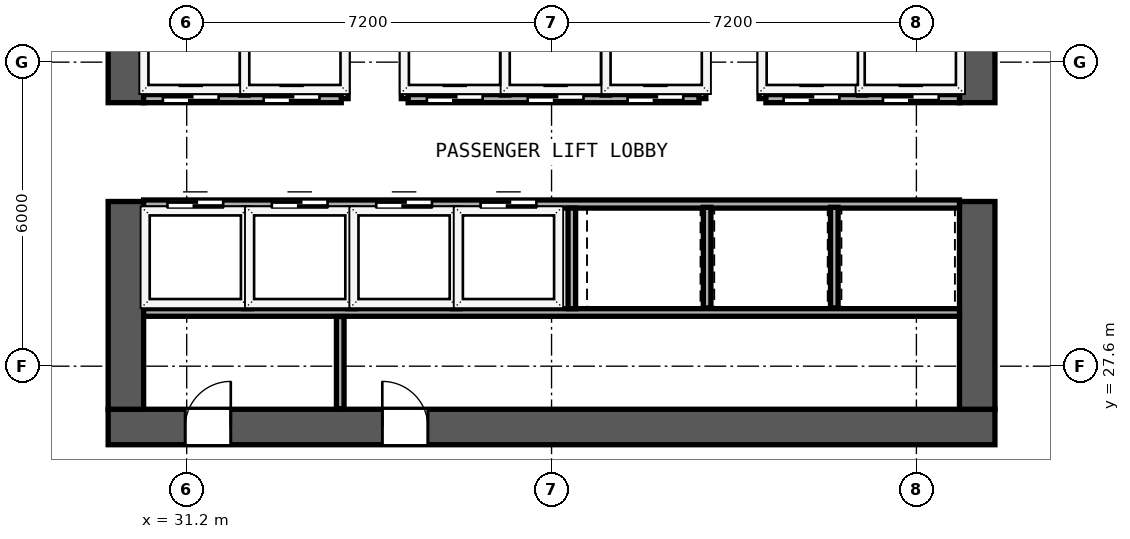
"""IFC4 building model, lengths in metres.
Left out: names, types, materials, properties, quantities, classifications, styles, units other than length and angle.
Written with IfcOpenShell. Run it as: python <this file> out.ifc"""

import sys

from ifc_helpers import new_model, si_unit, direction, frame, frame_2d, origin, place, context, subcontext, project, spatial, rectangle, extrude, element, fill, save


model = new_model("IFC4")
c1 = context("Model", 3, precision=1e-05, world=origin(), true_north=direction((0.0, 1.0)))
c2 = subcontext(c1, "Body", "Model", "MODEL_VIEW")
j1 = project(units=[si_unit("LENGTHUNIT", "METRE"), si_unit("PLANEANGLEUNIT", "RADIAN")], contexts=[c1])
p1 = place(None, origin())
s1 = spatial("IfcSite", under=j1, at=p1, CompositionType="ELEMENT")
p2 = place(p1, origin())
s2 = spatial("IfcBuilding", under=s1, at=p2, CompositionType="ELEMENT")
p3 = place(p2, frame((0.0, 0.0, 94.0)))
s3 = spatial("IfcBuildingStorey", under=s2, at=p3, CompositionType="ELEMENT", Elevation=94.0)
p4 = place(p3, frame((29.65, 26.4, 0.0), z_axis=(0.0, 0.0, 1.0), x_axis=(1.0, 0.0, 0.0)))
e1 = element("IfcWall", 1, at=p4, inside=s3, PredefinedType="SHEAR", context=c2, shape_type="SweptSolid", body=[
    extrude(rectangle(XDim=17.5, YDim=0.7, at=frame_2d((8.75, 0.0))), origin(), (0.0, 0.0, 1.0), 4.2),
])
p5 = place(p4, frame((2.42, 0.0, 0.0), z_axis=(0.0, 0.0, 1.0), x_axis=(-1.0, 0.0, 0.0)))
e2 = element("IfcOpeningElement", 2, at=p5, cuts=e1, PredefinedType="OPENING", context=c2, shape_type="SweptSolid", body=[
    extrude(rectangle(XDim=0.9, YDim=2.1, at=frame_2d((0.45, 1.05))), frame((0.0, 0.36, 0.0), z_axis=(0.0, -1.0, 0.0), x_axis=(1.0, 0.0, 0.0)), (0.0, 0.0, 1.0), 0.72),
])
p6 = place(p4, frame((6.31, 0.0, 0.0), z_axis=(0.0, 0.0, 1.0), x_axis=(-1.0, 0.0, 0.0)))
e3 = element("IfcOpeningElement", 3, at=p6, cuts=e1, PredefinedType="OPENING", context=c2, shape_type="SweptSolid", body=[
    extrude(rectangle(XDim=0.9, YDim=2.1, at=frame_2d((0.45, 1.05))), frame((0.0, 0.36, 0.0), z_axis=(0.0, -1.0, 0.0), x_axis=(1.0, 0.0, 0.0)), (0.0, 0.0, 1.0), 0.72),
])
p7 = place(p3, frame((30.0, 26.75, 0.0), z_axis=(0.0, 0.0, 1.0), x_axis=(0.0, 1.0, 0.0)))
e4 = element("IfcWall", 4, at=p7, inside=s3, PredefinedType="SHEAR", context=c2, shape_type="SweptSolid", body=[
    extrude(rectangle(XDim=4.1, YDim=0.7, at=frame_2d((2.05, 0.0))), origin(), (0.0, 0.0, 1.0), 4.2),
])
p8 = place(p3, frame((30.0, 32.8, 0.0), z_axis=(0.0, 0.0, 1.0), x_axis=(0.0, 1.0, 0.0)))
e5 = element("IfcWall", 5, at=p8, inside=s3, PredefinedType="SHEAR", context=c2, shape_type="SweptSolid", body=[
    extrude(rectangle(XDim=10.05, YDim=0.7, at=frame_2d((5.025, 0.0))), origin(), (0.0, 0.0, 1.0), 4.2),
])
p9 = place(p3, frame((46.8, 26.75, 0.0), z_axis=(0.0, 0.0, 1.0), x_axis=(0.0, 1.0, 0.0)))
e6 = element("IfcWall", 6, at=p9, inside=s3, PredefinedType="SHEAR", context=c2, shape_type="SweptSolid", body=[
    extrude(rectangle(XDim=4.1, YDim=0.7, at=frame_2d((2.05, 0.0))), origin(), (0.0, 0.0, 1.0), 4.2),
])
p10 = place(p3, frame((46.8, 32.8, 0.0), z_axis=(0.0, 0.0, 1.0), x_axis=(0.0, 1.0, 0.0)))
e7 = element("IfcWall", 7, at=p10, inside=s3, PredefinedType="SHEAR", context=c2, shape_type="SweptSolid", body=[
    extrude(rectangle(XDim=10.05, YDim=0.7, at=frame_2d((5.025, 0.0))), origin(), (0.0, 0.0, 1.0), 4.2),
])
for number, where, z_axis, x_axis in (
    (8, (34.31, 32.88, 0.0), (0.0, 0.0, 1.0), (0.0, 1.0, 0.0)),
    (9, (35.51, 32.88, 0.0), (0.0, 0.0, 1.0), (0.0, 1.0, 0.0)),
    (10, (41.37, 32.88, 0.0), (0.0, 0.0, 1.0), (0.0, 1.0, 0.0)),
    (11, (42.57, 32.88, 0.0), (0.0, 0.0, 1.0), (0.0, 1.0, 0.0)),
):
    element("IfcWall", number, at=place(p3, frame(where, z_axis=z_axis, x_axis=x_axis)), inside=s3, PredefinedType="SOLIDWALL", context=c2, shape_type="SweptSolid", body=[
        extrude(rectangle(XDim=2.17, YDim=0.15, at=frame_2d((1.085, 0.0))), origin(), (0.0, 0.0, 1.0), 4.2),
    ])
p11 = place(p3, frame((30.35, 32.88, 0.0), z_axis=(0.0, 0.0, 1.0), x_axis=(1.0, 0.0, 0.0)))
e12 = element("IfcWall", 12, at=p11, inside=s3, PredefinedType="SOLIDWALL", context=c2, shape_type="SweptSolid", body=[
    extrude(rectangle(XDim=3.9, YDim=0.16, at=frame_2d((1.95, 0.0))), origin(), (0.0, 0.0, 1.0), 4.2),
])
p12 = place(p11, frame((1.48, 0.0, 0.0), z_axis=(0.0, 0.0, 1.0), x_axis=(-1.0, 0.0, 0.0)))
e13 = element("IfcOpeningElement", 13, at=p12, cuts=e12, PredefinedType="OPENING", context=c2, shape_type="SweptSolid", body=[
    extrude(rectangle(XDim=1.1, YDim=2.2, at=frame_2d((0.55, 1.1))), frame((0.0, 0.09, 0.0), z_axis=(0.0, -1.0, 0.0), x_axis=(1.0, 0.0, 0.0)), (0.0, 0.0, 1.0), 0.18),
])
p13 = place(p11, frame((3.47, 0.0, 0.0), z_axis=(0.0, 0.0, 1.0), x_axis=(-1.0, 0.0, 0.0)))
e14 = element("IfcOpeningElement", 14, at=p13, cuts=e12, PredefinedType="OPENING", context=c2, shape_type="SweptSolid", body=[
    extrude(rectangle(XDim=1.1, YDim=2.2, at=frame_2d((0.55, 1.1))), frame((0.0, 0.09, 0.0), z_axis=(0.0, -1.0, 0.0), x_axis=(1.0, 0.0, 0.0)), (0.0, 0.0, 1.0), 0.18),
])
p14 = place(p3, frame((35.57, 32.88, 0.0), z_axis=(0.0, 0.0, 1.0), x_axis=(1.0, 0.0, 0.0)))
e15 = element("IfcWall", 15, at=p14, inside=s3, PredefinedType="SOLIDWALL", context=c2, shape_type="SweptSolid", body=[
    extrude(rectangle(XDim=5.74, YDim=0.16, at=frame_2d((2.87, 0.0))), origin(), (0.0, 0.0, 1.0), 4.2),
])
p15 = place(p14, frame((1.47, 0.0, 0.0), z_axis=(0.0, 0.0, 1.0), x_axis=(-1.0, 0.0, 0.0)))
e16 = element("IfcOpeningElement", 16, at=p15, cuts=e15, PredefinedType="OPENING", context=c2, shape_type="SweptSolid", body=[
    extrude(rectangle(XDim=1.1, YDim=2.2, at=frame_2d((0.55, 1.1))), frame((0.0, 0.09, 0.0), z_axis=(0.0, -1.0, 0.0), x_axis=(1.0, 0.0, 0.0)), (0.0, 0.0, 1.0), 0.18),
])
p16 = place(p14, frame((3.46, 0.0, 0.0), z_axis=(0.0, 0.0, 1.0), x_axis=(-1.0, 0.0, 0.0)))
e17 = element("IfcOpeningElement", 17, at=p16, cuts=e15, PredefinedType="OPENING", context=c2, shape_type="SweptSolid", body=[
    extrude(rectangle(XDim=1.1, YDim=2.2, at=frame_2d((0.55, 1.1))), frame((0.0, 0.09, 0.0), z_axis=(0.0, -1.0, 0.0), x_axis=(1.0, 0.0, 0.0)), (0.0, 0.0, 1.0), 0.18),
])
p17 = place(p14, frame((5.43, 0.0, 0.0), z_axis=(0.0, 0.0, 1.0), x_axis=(-1.0, 0.0, 0.0)))
e18 = element("IfcOpeningElement", 18, at=p17, cuts=e15, PredefinedType="OPENING", context=c2, shape_type="SweptSolid", body=[
    extrude(rectangle(XDim=1.1, YDim=2.2, at=frame_2d((0.55, 1.1))), frame((0.0, 0.09, 0.0), z_axis=(0.0, -1.0, 0.0), x_axis=(1.0, 0.0, 0.0)), (0.0, 0.0, 1.0), 0.18),
])
p18 = place(p3, frame((42.63, 32.88, 0.0), z_axis=(0.0, 0.0, 1.0), x_axis=(1.0, 0.0, 0.0)))
e19 = element("IfcWall", 19, at=p18, inside=s3, PredefinedType="SOLIDWALL", context=c2, shape_type="SweptSolid", body=[
    extrude(rectangle(XDim=3.82, YDim=0.16, at=frame_2d((1.91, 0.0))), origin(), (0.0, 0.0, 1.0), 4.2),
])
p19 = place(p18, frame((1.45, 0.0, 0.0), z_axis=(0.0, 0.0, 1.0), x_axis=(-1.0, 0.0, 0.0)))
e20 = element("IfcOpeningElement", 20, at=p19, cuts=e19, PredefinedType="OPENING", context=c2, shape_type="SweptSolid", body=[
    extrude(rectangle(XDim=1.1, YDim=2.2, at=frame_2d((0.55, 1.1))), frame((0.0, 0.09, 0.0), z_axis=(0.0, -1.0, 0.0), x_axis=(1.0, 0.0, 0.0)), (0.0, 0.0, 1.0), 0.18),
])
p20 = place(p18, frame((3.41, 0.0, 0.0), z_axis=(0.0, 0.0, 1.0), x_axis=(-1.0, 0.0, 0.0)))
e21 = element("IfcOpeningElement", 21, at=p20, cuts=e19, PredefinedType="OPENING", context=c2, shape_type="SweptSolid", body=[
    extrude(rectangle(XDim=1.1, YDim=2.2, at=frame_2d((0.55, 1.1))), frame((0.0, 0.09, 0.0), z_axis=(0.0, -1.0, 0.0), x_axis=(1.0, 0.0, 0.0)), (0.0, 0.0, 1.0), 0.18),
])
for number, where, z_axis, x_axis in (
    (22, (32.34, 32.95, 0.0), (0.0, 0.0, 1.0), (0.0, 1.0, 0.0)),
    (23, (37.48, 32.95, 0.0), (0.0, 0.0, 1.0), (0.0, 1.0, 0.0)),
    (24, (39.47, 32.95, 0.0), (0.0, 0.0, 1.0), (0.0, 1.0, 0.0)),
    (25, (44.53, 32.95, 0.0), (0.0, 0.0, 1.0), (0.0, 1.0, 0.0)),
):
    element("IfcWall", number, at=place(p3, frame(where, z_axis=z_axis, x_axis=x_axis)), inside=s3, PredefinedType="SOLIDWALL", context=c2, shape_type="SweptSolid", body=[
        extrude(rectangle(XDim=2.05, YDim=0.15, at=frame_2d((1.025, 0.0))), origin(), (0.0, 0.0, 1.0), 4.2),
    ])
p21 = place(p3, frame((30.35, 30.8, 0.0), z_axis=(0.0, 0.0, 1.0), x_axis=(1.0, 0.0, 0.0)))
e26 = element("IfcWall", 26, at=p21, inside=s3, PredefinedType="SOLIDWALL", context=c2, shape_type="SweptSolid", body=[
    extrude(rectangle(XDim=16.1, YDim=0.16, at=frame_2d((8.05, 0.0))), origin(), (0.0, 0.0, 1.0), 4.2),
])
p22 = place(p21, frame((0.47, 0.0, 0.0)))
e27 = element("IfcOpeningElement", 27, at=p22, cuts=e26, PredefinedType="OPENING", context=c2, shape_type="SweptSolid", body=[
    extrude(rectangle(XDim=1.1, YDim=2.2, at=frame_2d((0.55, 1.1))), frame((0.0, 0.09, 0.0), z_axis=(0.0, -1.0, 0.0), x_axis=(1.0, 0.0, 0.0)), (0.0, 0.0, 1.0), 0.18),
])
p23 = place(p21, frame((2.53, 0.0, 0.0)))
e28 = element("IfcOpeningElement", 28, at=p23, cuts=e26, PredefinedType="OPENING", context=c2, shape_type="SweptSolid", body=[
    extrude(rectangle(XDim=1.1, YDim=2.2, at=frame_2d((0.55, 1.1))), frame((0.0, 0.09, 0.0), z_axis=(0.0, -1.0, 0.0), x_axis=(1.0, 0.0, 0.0)), (0.0, 0.0, 1.0), 0.18),
])
p24 = place(p21, frame((4.59, 0.0, 0.0)))
e29 = element("IfcOpeningElement", 29, at=p24, cuts=e26, PredefinedType="OPENING", context=c2, shape_type="SweptSolid", body=[
    extrude(rectangle(XDim=1.1, YDim=2.2, at=frame_2d((0.55, 1.1))), frame((0.0, 0.09, 0.0), z_axis=(0.0, -1.0, 0.0), x_axis=(1.0, 0.0, 0.0)), (0.0, 0.0, 1.0), 0.18),
])
p25 = place(p21, frame((6.65, 0.0, 0.0)))
e30 = element("IfcOpeningElement", 30, at=p25, cuts=e26, PredefinedType="OPENING", context=c2, shape_type="SweptSolid", body=[
    extrude(rectangle(XDim=1.1, YDim=2.2, at=frame_2d((0.55, 1.1))), frame((0.0, 0.09, 0.0), z_axis=(0.0, -1.0, 0.0), x_axis=(1.0, 0.0, 0.0)), (0.0, 0.0, 1.0), 0.18),
])
p26 = place(p3, frame((30.35, 28.66, 0.0), z_axis=(0.0, 0.0, 1.0), x_axis=(1.0, 0.0, 0.0)))
e31 = element("IfcWall", 31, at=p26, inside=s3, PredefinedType="PARTITIONING", context=c2, shape_type="SweptSolid", body=[
    extrude(rectangle(XDim=16.1, YDim=0.15, at=frame_2d((8.05, 0.0))), origin(), (0.0, 0.0, 1.0), 4.2),
])
for number, where, z_axis, x_axis in (
    (32, (32.4, 28.735, 0.0), (0.0, 0.0, 1.0), (0.0, 1.0, 0.0)),
    (33, (34.46, 28.735, 0.0), (0.0, 0.0, 1.0), (0.0, 1.0, 0.0)),
    (34, (36.52, 28.735, 0.0), (0.0, 0.0, 1.0), (0.0, 1.0, 0.0)),
    (35, (38.8, 28.735, 0.0), (0.0, 0.0, 1.0), (0.0, 1.0, 0.0)),
):
    element("IfcWall", number, at=place(p3, frame(where, z_axis=z_axis, x_axis=x_axis)), inside=s3, PredefinedType="SOLIDWALL", context=c2, shape_type="SweptSolid", body=[
        extrude(rectangle(XDim=1.985, YDim=0.15, at=frame_2d((0.992, 0.0))), origin(), (0.0, 0.0, 1.0), 4.2),
    ])
p27 = place(p3, frame((34.23, 26.76, 0.0), z_axis=(0.0, 0.0, 1.0), x_axis=(0.0, 1.0, 0.0)))
e36 = element("IfcWall", 36, at=p27, inside=s3, PredefinedType="PARTITIONING", context=c2, shape_type="SweptSolid", body=[
    extrude(rectangle(XDim=1.82, YDim=0.15, at=frame_2d((0.91, 0.0))), origin(), (0.0, 0.0, 1.0), 4.2),
])
for number, where, z_axis, x_axis in (
    (37, (41.47, 28.75, 0.0), (0.0, 0.0, 1.0), (0.0, 1.0, 0.0)),
    (38, (43.98, 28.75, 0.0), (0.0, 0.0, 1.0), (0.0, 1.0, 0.0)),
):
    element("IfcWall", number, at=place(p3, frame(where, z_axis=z_axis, x_axis=x_axis)), inside=s3, PredefinedType="SOLIDWALL", context=c2, shape_type="SweptSolid", body=[
        extrude(rectangle(XDim=1.985, YDim=0.15, at=frame_2d((0.993, 0.0))), origin(), (0.0, 0.0, 1.0), 4.2),
    ])
p28 = place(p12, origin())
e39 = element("IfcDoor", 39, at=p28, inside=s3, OperationType="SLIDING_TO_LEFT", PredefinedType="DOOR", context=c2, shape_type="SweptSolid", body=[
    extrude(rectangle(XDim=1.1, YDim=2.2, at=frame_2d((0.55, 1.1))), frame((0.0, 0.025, 0.0), z_axis=(0.0, -1.0, 0.0), x_axis=(1.0, 0.0, 0.0)), (0.0, 0.0, 1.0), 0.05),
])
fill(e13, e39)
p29 = place(p13, origin())
e40 = element("IfcDoor", 40, at=p29, inside=s3, OperationType="SLIDING_TO_LEFT", PredefinedType="DOOR", context=c2, shape_type="SweptSolid", body=[
    extrude(rectangle(XDim=1.1, YDim=2.2, at=frame_2d((0.55, 1.1))), frame((0.0, 0.025, 0.0), z_axis=(0.0, -1.0, 0.0), x_axis=(1.0, 0.0, 0.0)), (0.0, 0.0, 1.0), 0.05),
])
fill(e14, e40)
p30 = place(p15, origin())
e41 = element("IfcDoor", 41, at=p30, inside=s3, OperationType="SLIDING_TO_LEFT", PredefinedType="DOOR", context=c2, shape_type="SweptSolid", body=[
    extrude(rectangle(XDim=1.1, YDim=2.2, at=frame_2d((0.55, 1.1))), frame((0.0, 0.025, 0.0), z_axis=(0.0, -1.0, 0.0), x_axis=(1.0, 0.0, 0.0)), (0.0, 0.0, 1.0), 0.05),
])
fill(e16, e41)
p31 = place(p16, origin())
e42 = element("IfcDoor", 42, at=p31, inside=s3, OperationType="SLIDING_TO_LEFT", PredefinedType="DOOR", context=c2, shape_type="SweptSolid", body=[
    extrude(rectangle(XDim=1.1, YDim=2.2, at=frame_2d((0.55, 1.1))), frame((0.0, 0.025, 0.0), z_axis=(0.0, -1.0, 0.0), x_axis=(1.0, 0.0, 0.0)), (0.0, 0.0, 1.0), 0.05),
])
fill(e17, e42)
p32 = place(p17, origin())
e43 = element("IfcDoor", 43, at=p32, inside=s3, OperationType="SLIDING_TO_RIGHT", PredefinedType="DOOR", context=c2, shape_type="SweptSolid", body=[
    extrude(rectangle(XDim=1.1, YDim=2.2, at=frame_2d((0.55, 1.1))), frame((0.0, 0.025, 0.0), z_axis=(0.0, -1.0, 0.0), x_axis=(1.0, 0.0, 0.0)), (0.0, 0.0, 1.0), 0.05),
])
fill(e18, e43)
p33 = place(p19, origin())
e44 = element("IfcDoor", 44, at=p33, inside=s3, OperationType="SLIDING_TO_RIGHT", PredefinedType="DOOR", context=c2, shape_type="SweptSolid", body=[
    extrude(rectangle(XDim=1.1, YDim=2.2, at=frame_2d((0.55, 1.1))), frame((0.0, 0.025, 0.0), z_axis=(0.0, -1.0, 0.0), x_axis=(1.0, 0.0, 0.0)), (0.0, 0.0, 1.0), 0.05),
])
fill(e20, e44)
p34 = place(p20, origin())
e45 = element("IfcDoor", 45, at=p34, inside=s3, OperationType="SLIDING_TO_RIGHT", PredefinedType="DOOR", context=c2, shape_type="SweptSolid", body=[
    extrude(rectangle(XDim=1.1, YDim=2.2, at=frame_2d((0.55, 1.1))), frame((0.0, 0.025, 0.0), z_axis=(0.0, -1.0, 0.0), x_axis=(1.0, 0.0, 0.0)), (0.0, 0.0, 1.0), 0.05),
])
fill(e21, e45)
p35 = place(p22, origin())
e46 = element("IfcDoor", 46, at=p35, inside=s3, OperationType="SLIDING_TO_LEFT", PredefinedType="DOOR", context=c2, shape_type="SweptSolid", body=[
    extrude(rectangle(XDim=1.1, YDim=2.2, at=frame_2d((0.55, 1.1))), frame((0.0, 0.025, 0.0), z_axis=(0.0, -1.0, 0.0), x_axis=(1.0, 0.0, 0.0)), (0.0, 0.0, 1.0), 0.05),
])
fill(e27, e46)
p36 = place(p23, origin())
e47 = element("IfcDoor", 47, at=p36, inside=s3, OperationType="SLIDING_TO_LEFT", PredefinedType="DOOR", context=c2, shape_type="SweptSolid", body=[
    extrude(rectangle(XDim=1.1, YDim=2.2, at=frame_2d((0.55, 1.1))), frame((0.0, 0.025, 0.0), z_axis=(0.0, -1.0, 0.0), x_axis=(1.0, 0.0, 0.0)), (0.0, 0.0, 1.0), 0.05),
])
fill(e28, e47)
p37 = place(p24, origin())
e48 = element("IfcDoor", 48, at=p37, inside=s3, OperationType="SLIDING_TO_LEFT", PredefinedType="DOOR", context=c2, shape_type="SweptSolid", body=[
    extrude(rectangle(XDim=1.1, YDim=2.2, at=frame_2d((0.55, 1.1))), frame((0.0, 0.025, 0.0), z_axis=(0.0, -1.0, 0.0), x_axis=(1.0, 0.0, 0.0)), (0.0, 0.0, 1.0), 0.05),
])
fill(e29, e48)
p38 = place(p25, origin())
e49 = element("IfcDoor", 49, at=p38, inside=s3, OperationType="SLIDING_TO_LEFT", PredefinedType="DOOR", context=c2, shape_type="SweptSolid", body=[
    extrude(rectangle(XDim=1.1, YDim=2.2, at=frame_2d((0.55, 1.1))), frame((0.0, 0.025, 0.0), z_axis=(0.0, -1.0, 0.0), x_axis=(1.0, 0.0, 0.0)), (0.0, 0.0, 1.0), 0.05),
])
fill(e30, e49)
p39 = place(p5, origin())
e50 = element("IfcDoor", 50, at=p39, inside=s3, OperationType="SINGLE_SWING_LEFT", PredefinedType="DOOR", context=c2, shape_type="SweptSolid", body=[
    extrude(rectangle(XDim=0.9, YDim=2.1, at=frame_2d((0.45, 1.05))), frame((0.0, -0.195, 0.0), z_axis=(0.0, -1.0, 0.0), x_axis=(1.0, 0.0, 0.0)), (0.0, 0.0, 1.0), 0.05),
])
fill(e2, e50)
p40 = place(p6, origin())
e51 = element("IfcDoor", 51, at=p40, inside=s3, OperationType="SINGLE_SWING_RIGHT", PredefinedType="DOOR", context=c2, shape_type="SweptSolid", body=[
    extrude(rectangle(XDim=0.9, YDim=2.1, at=frame_2d((0.45, 1.05))), frame((0.0, -0.195, 0.0), z_axis=(0.0, -1.0, 0.0), x_axis=(1.0, 0.0, 0.0)), (0.0, 0.0, 1.0), 0.05),
])
fill(e3, e51)
save(model, sys.argv[1])
